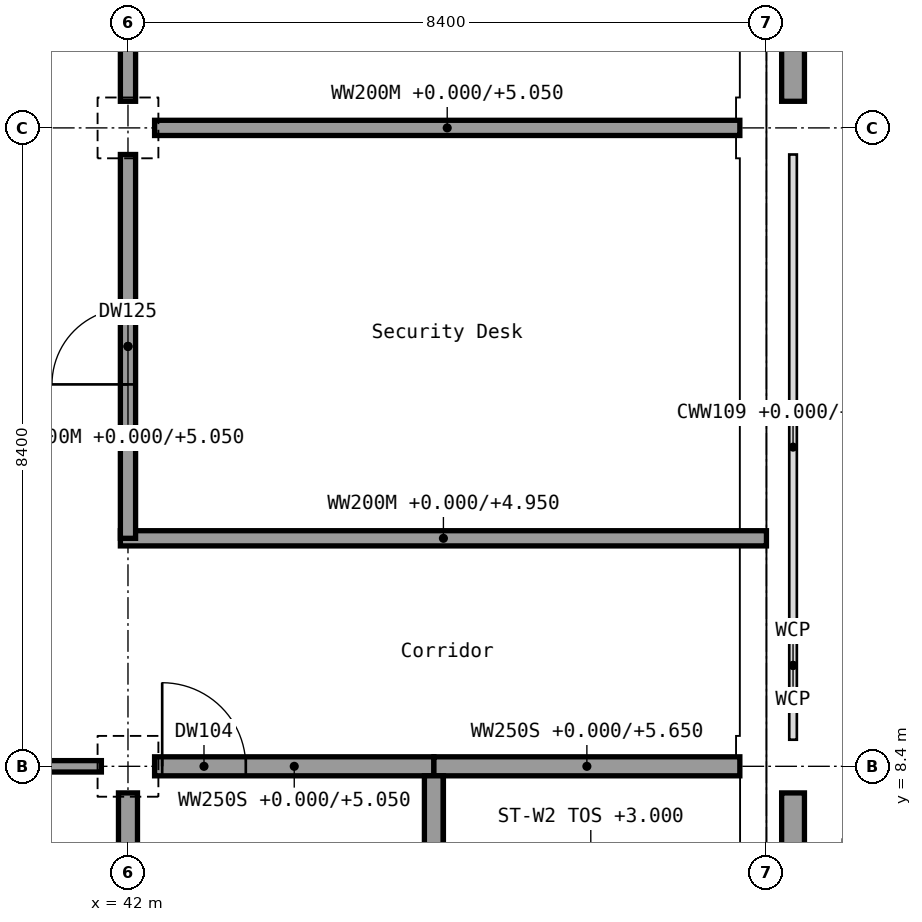
"""IFC4 building model, lengths in metres.
Left out: names, types, materials, properties, quantities, classifications, styles, units other than length and angle.
Written with IfcOpenShell. Run it as: python <this file> out.ifc"""

import sys

from ifc_helpers import new_model, si_unit, direction, frame, frame_2d, origin, origin_2d, place, context, subcontext, project, spatial, rectangle, extrude, element, fill, save


model = new_model("IFC4")
c1 = context("Model", 3, precision=1e-05, world=origin(), true_north=direction((0.0, 1.0)))
c2 = subcontext(c1, "Body", "Model", "MODEL_VIEW")
j1 = project(units=[si_unit("LENGTHUNIT", "METRE"), si_unit("PLANEANGLEUNIT", "RADIAN")], contexts=[c1])
p1 = place(None, origin())
s1 = spatial("IfcSite", under=j1, at=p1, CompositionType="ELEMENT")
p2 = place(p1, origin())
s2 = spatial("IfcBuilding", under=s1, at=p2, CompositionType="ELEMENT")
p3 = place(p2, origin())
s3 = spatial("IfcBuildingStorey", under=s2, at=p3, CompositionType="ELEMENT", Elevation=0.0)
for number, where, z_axis, x_axis in (
    (1, (42.0, 8.4, 0.0), (0.0, 0.0, 1.0), (1.0, 0.0, 0.0)),
    (2, (42.0, 16.8, 0.0), (0.0, 0.0, 1.0), (1.0, 0.0, 0.0)),
    (3, (50.4, 8.4, 0.0), (0.0, 0.0, 1.0), (1.0, 0.0, 0.0)),
    (4, (50.4, 16.8, 0.0), (0.0, 0.0, 1.0), (1.0, 0.0, 0.0)),
):
    element("IfcColumn", number, at=place(p3, frame(where, z_axis=z_axis, x_axis=x_axis)), inside=s3, PredefinedType="COLUMN", context=c2, shape_type="SweptSolid", body=[
        extrude(rectangle(XDim=0.7, YDim=0.7, at=origin_2d()), origin(), (0.0, 0.0, 1.0), 6.0),
    ])
p4 = place(p3, frame((50.75, 0.35, 0.0), z_axis=(0.0, 0.0, 1.0), x_axis=(0.0, 1.0, 0.0)))
e5 = element("IfcWall", 5, at=p4, inside=s3, PredefinedType="SOLIDWALL", context=c2, shape_type="SweptSolid", body=[
    extrude(rectangle(XDim=7.7, YDim=0.3, at=frame_2d((3.85, 0.0))), origin(), (0.0, 0.0, 1.0), 5.3),
])
p5 = place(p4, frame((3.25, 0.0, 1.0)))
e6 = element("IfcOpeningElement", 6, at=p5, cuts=e5, PredefinedType="OPENING", context=c2, shape_type="SweptSolid", body=[
    extrude(rectangle(XDim=1.2, YDim=1.5, at=frame_2d((0.6, 0.75))), frame((0.0, 0.15, 0.0), z_axis=(0.0, -1.0, 0.0), x_axis=(1.0, 0.0, 0.0)), (0.0, 0.0, 1.0), 0.3),
])
p6 = place(p4, frame((0.55, 0.0, 0.0)))
e7 = element("IfcOpeningElement", 7, at=p6, cuts=e5, PredefinedType="OPENING", context=c2, shape_type="SweptSolid", body=[
    extrude(rectangle(XDim=1.2, YDim=2.1, at=frame_2d((0.6, 1.05))), frame((0.0, 0.15, 0.0), z_axis=(0.0, -1.0, 0.0), x_axis=(1.0, 0.0, 0.0)), (0.0, 0.0, 1.0), 0.3),
])
p7 = place(p3, frame((50.75, 17.15, 0.0), z_axis=(0.0, 0.0, 1.0), x_axis=(0.0, 1.0, 0.0)))
e8 = element("IfcWall", 8, at=p7, inside=s3, PredefinedType="SOLIDWALL", context=c2, shape_type="SweptSolid", body=[
    extrude(rectangle(XDim=7.7, YDim=0.3, at=frame_2d((3.85, 0.0))), origin(), (0.0, 0.0, 1.0), 5.3),
])
p8 = place(p7, frame((2.95, 0.0, 0.0)))
e9 = element("IfcOpeningElement", 9, at=p8, cuts=e8, PredefinedType="OPENING", context=c2, shape_type="SweptSolid", body=[
    extrude(rectangle(XDim=1.8, YDim=2.4, at=frame_2d((0.9, 1.2))), frame((0.0, 0.15, 0.0), z_axis=(0.0, -1.0, 0.0), x_axis=(1.0, 0.0, 0.0)), (0.0, 0.0, 1.0), 0.3),
])
p9 = place(p3, frame((33.95, 8.4, 0.0), z_axis=(0.0, 0.0, 1.0), x_axis=(1.0, 0.0, 0.0)))
e10 = element("IfcWall", 10, at=p9, inside=s3, PredefinedType="PARTITIONING", context=c2, shape_type="SweptSolid", body=[
    extrude(rectangle(XDim=7.7, YDim=0.15, at=frame_2d((3.85, 0.0))), origin(), (0.0, 0.0, 1.0), 5.05),
])
p10 = place(p9, frame((3.35, 0.0, 0.0)))
e11 = element("IfcOpeningElement", 11, at=p10, cuts=e10, PredefinedType="OPENING", context=c2, shape_type="SweptSolid", body=[
    extrude(rectangle(XDim=1.0, YDim=2.1, at=frame_2d((0.5, 1.05))), frame((0.0, 0.075, 0.0), z_axis=(0.0, -1.0, 0.0), x_axis=(1.0, 0.0, 0.0)), (0.0, 0.0, 1.0), 0.15),
])
p11 = place(p3, frame((42.35, 8.4, 0.0), z_axis=(0.0, 0.0, 1.0), x_axis=(1.0, 0.0, 0.0)))
e12 = element("IfcWall", 12, at=p11, inside=s3, PredefinedType="SHEAR", context=c2, shape_type="SweptSolid", body=[
    extrude(rectangle(XDim=3.675, YDim=0.25, at=frame_2d((1.837, 0.0))), origin(), (0.0, 0.0, 1.0), 5.05),
])
p12 = place(p11, frame((0.1, 0.0, 0.0)))
e13 = element("IfcOpeningElement", 13, at=p12, cuts=e12, PredefinedType="OPENING", context=c2, shape_type="SweptSolid", body=[
    extrude(rectangle(XDim=1.1, YDim=2.1, at=frame_2d((0.55, 1.05))), frame((0.0, 0.125, 0.0), z_axis=(0.0, -1.0, 0.0), x_axis=(1.0, 0.0, 0.0)), (0.0, 0.0, 1.0), 0.25),
])
p13 = place(p3, frame((46.025, 8.4, 0.0), z_axis=(0.0, 0.0, 1.0), x_axis=(1.0, 0.0, 0.0)))
e14 = element("IfcWall", 14, at=p13, inside=s3, PredefinedType="SHEAR", context=c2, shape_type="SweptSolid", body=[
    extrude(rectangle(XDim=4.025, YDim=0.25, at=frame_2d((2.013, 0.0))), origin(), (0.0, 0.0, 1.0), 5.65),
])
p14 = place(p3, frame((41.9, 11.4, 0.0), z_axis=(0.0, 0.0, 1.0), x_axis=(1.0, 0.0, 0.0)))
e15 = element("IfcWall", 15, at=p14, inside=s3, PredefinedType="PARTITIONING", context=c2, shape_type="SweptSolid", body=[
    extrude(rectangle(XDim=8.5, YDim=0.2, at=frame_2d((4.25, 0.0))), origin(), (0.0, 0.0, 1.0), 4.95),
])
p15 = place(p3, frame((42.35, 16.8, 0.0), z_axis=(0.0, 0.0, 1.0), x_axis=(1.0, 0.0, 0.0)))
e16 = element("IfcWall", 16, at=p15, inside=s3, PredefinedType="PARTITIONING", context=c2, shape_type="SweptSolid", body=[
    extrude(rectangle(XDim=7.7, YDim=0.2, at=frame_2d((3.85, 0.0))), origin(), (0.0, 0.0, 1.0), 5.05),
])
p16 = place(p3, frame((42.0, 0.35, 0.0), z_axis=(0.0, 0.0, 1.0), x_axis=(0.0, 1.0, 0.0)))
e17 = element("IfcWall", 17, at=p16, inside=s3, PredefinedType="SHEAR", context=c2, shape_type="SweptSolid", body=[
    extrude(rectangle(XDim=7.7, YDim=0.25, at=frame_2d((3.85, 0.0))), origin(), (0.0, 0.0, 1.0), 5.05),
])
p17 = place(p3, frame((42.0, 11.4, 0.0), z_axis=(0.0, 0.0, 1.0), x_axis=(0.0, 1.0, 0.0)))
e18 = element("IfcWall", 18, at=p17, inside=s3, PredefinedType="PARTITIONING", context=c2, shape_type="SweptSolid", body=[
    extrude(rectangle(XDim=5.05, YDim=0.2, at=frame_2d((2.525, 0.0))), origin(), (0.0, 0.0, 1.0), 5.05),
])
p18 = place(p17, frame((2.025, 0.0, 0.0)))
e19 = element("IfcOpeningElement", 19, at=p18, cuts=e18, PredefinedType="OPENING", context=c2, shape_type="SweptSolid", body=[
    extrude(rectangle(XDim=1.0, YDim=2.1, at=frame_2d((0.5, 1.05))), frame((0.0, 0.1, 0.0), z_axis=(0.0, -1.0, 0.0), x_axis=(1.0, 0.0, 0.0)), (0.0, 0.0, 1.0), 0.2),
])
p19 = place(p3, frame((42.0, 17.15, 0.0), z_axis=(0.0, 0.0, 1.0), x_axis=(0.0, 1.0, 0.0)))
e20 = element("IfcWall", 20, at=p19, inside=s3, PredefinedType="PARTITIONING", context=c2, shape_type="SweptSolid", body=[
    extrude(rectangle(XDim=7.7, YDim=0.2, at=frame_2d((3.85, 0.0))), origin(), (0.0, 0.0, 1.0), 5.05),
])
p20 = place(p3, frame((46.025, 0.35, 0.0), z_axis=(0.0, 0.0, 1.0), x_axis=(0.0, 1.0, 0.0)))
e21 = element("IfcWall", 21, at=p20, inside=s3, PredefinedType="SHEAR", context=c2, shape_type="SweptSolid", body=[
    extrude(rectangle(XDim=7.925, YDim=0.25, at=frame_2d((3.962, 0.0))), origin(), (0.0, 0.0, 1.0), 5.65),
])
p21 = place(p20, frame((0.1, 0.0, 0.0)))
e22 = element("IfcOpeningElement", 22, at=p21, cuts=e21, PredefinedType="OPENING", context=c2, shape_type="SweptSolid", body=[
    extrude(rectangle(XDim=1.1, YDim=2.1, at=frame_2d((0.55, 1.05))), frame((0.0, 0.125, 0.0), z_axis=(0.0, -1.0, 0.0), x_axis=(1.0, 0.0, 0.0)), (0.0, 0.0, 1.0), 0.25),
])
p22 = place(p12, origin())
e23 = element("IfcDoor", 23, at=p22, inside=s3, OperationType="SINGLE_SWING_LEFT", PredefinedType="DOOR", context=c2, shape_type="SweptSolid", body=[
    extrude(rectangle(XDim=1.1, YDim=2.1, at=frame_2d((0.55, 1.05))), frame((0.0, 0.025, 0.0), z_axis=(0.0, -1.0, 0.0), x_axis=(1.0, 0.0, 0.0)), (0.0, 0.0, 1.0), 0.05),
])
fill(e13, e23)
p23 = place(p18, origin())
e24 = element("IfcDoor", 24, at=p23, inside=s3, OperationType="SINGLE_SWING_LEFT", PredefinedType="DOOR", context=c2, shape_type="SweptSolid", body=[
    extrude(rectangle(XDim=1.0, YDim=2.1, at=frame_2d((0.5, 1.05))), frame((0.0, 0.025, 0.0), z_axis=(0.0, -1.0, 0.0), x_axis=(1.0, 0.0, 0.0)), (0.0, 0.0, 1.0), 0.05),
])
fill(e19, e24)
save(model, sys.argv[1])
